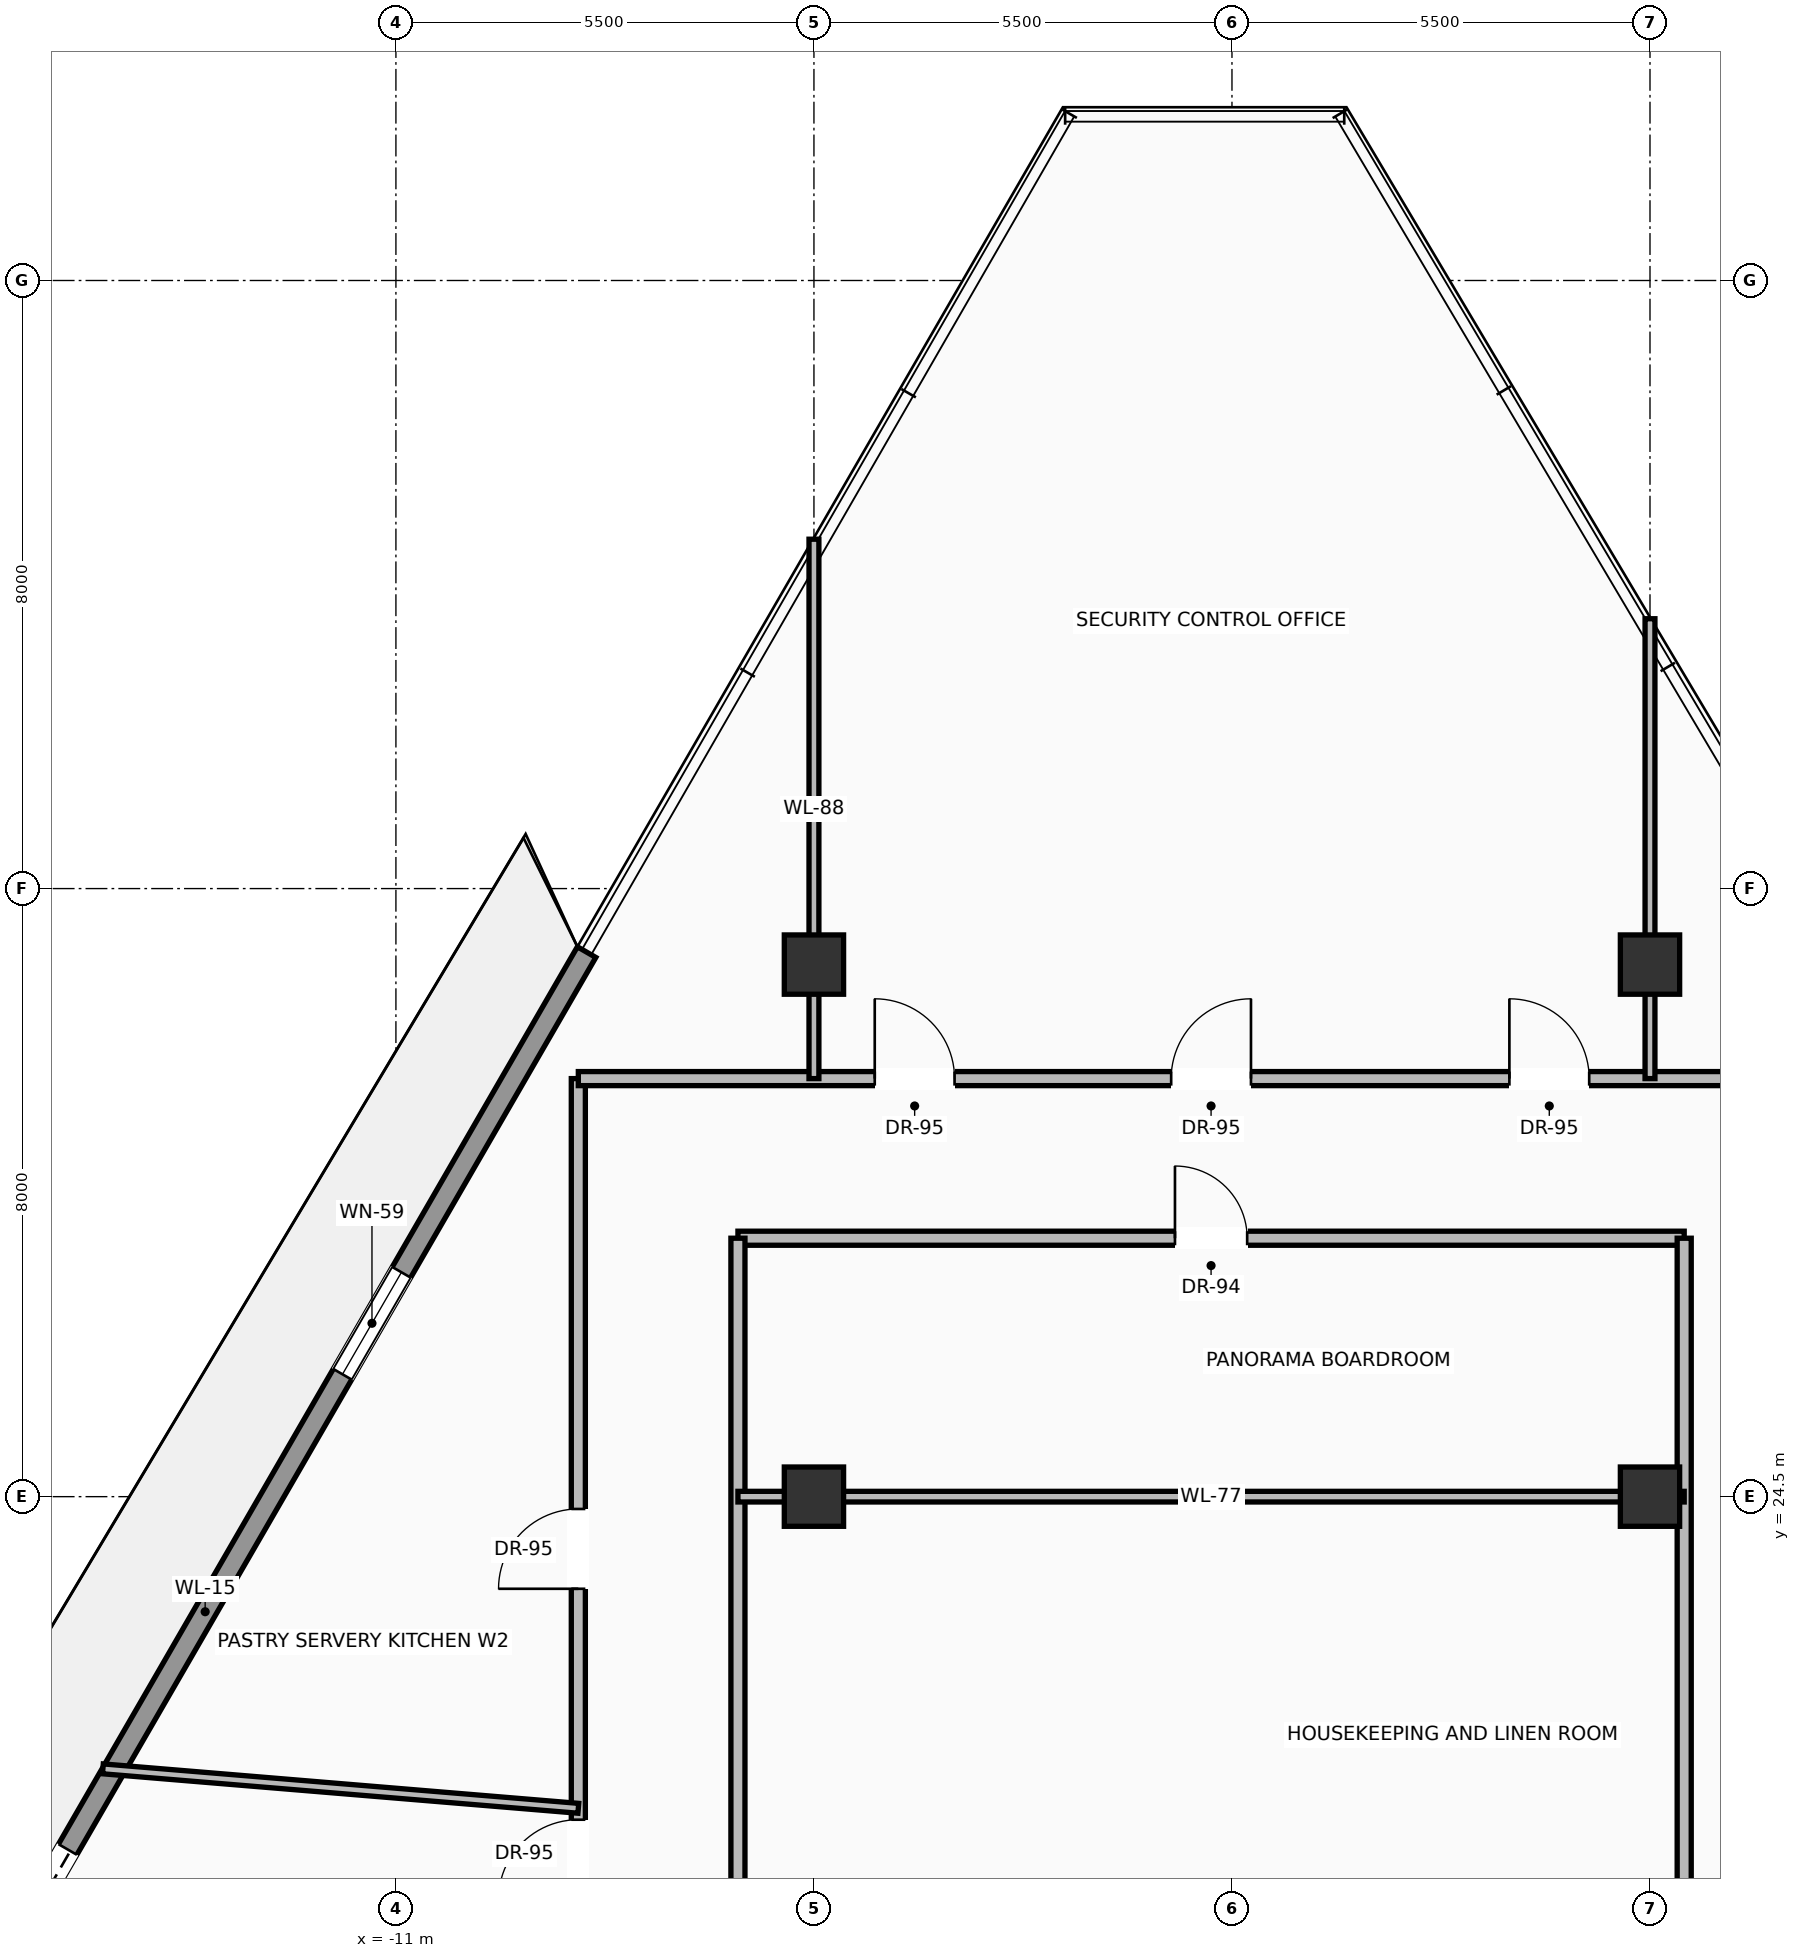
"""IFC4 building model, lengths in metres.
Left out: names, types, materials, properties, quantities, classifications, styles, units other than length and angle.
Written with IfcOpenShell. Run it as: python <this file> out.ifc"""

import sys

from ifc_helpers import new_model, si_unit, direction, frame, frame_2d, origin, origin_2d, place, context, subcontext, project, spatial, rectangle, extrude, source, transform, mapped, element, fill, save


model = new_model("IFC4")
c1 = context("Model", 3, precision=1e-05, world=origin(), true_north=direction((0.0, 1.0)))
c2 = subcontext(c1, "Body", "Model", "MODEL_VIEW")
j1 = project(units=[si_unit("LENGTHUNIT", "METRE"), si_unit("PLANEANGLEUNIT", "RADIAN")], contexts=[c1])
p1 = place(None, origin())
s1 = spatial("IfcSite", under=j1, at=p1, CompositionType="ELEMENT")
p2 = place(p1, origin())
s2 = spatial("IfcBuilding", under=s1, at=p2, CompositionType="ELEMENT")
p3 = place(p2, frame((0.0, 0.0, 273.0)))
s3 = spatial("IfcBuildingStorey", under=s2, at=p3, CompositionType="ELEMENT", Elevation=273.0)
m1 = source(origin(), c2, "Body", "SweptSolid", [
    extrude(rectangle(XDim=0.78, YDim=0.78, at=origin_2d()), origin(), (0.0, 0.0, 1.0), 3.45),
])
for number, where, z_axis, x_axis in (
    (1, (-5.5, 24.5, 0.0), (0.0, 0.0, 1.0), (1.0, 0.0, 0.0)),
    (2, (5.5, 24.5, 0.0), (0.0, 0.0, 1.0), (1.0, 0.0, 0.0)),
    (3, (-5.5, 31.5, 0.0), (0.0, 0.0, 1.0), (1.0, 0.0, 0.0)),
    (4, (5.5, 31.5, 0.0), (0.0, 0.0, 1.0), (1.0, 0.0, 0.0)),
):
    element("IfcColumn", number, at=place(p3, frame(where, z_axis=z_axis, x_axis=x_axis)), inside=s3, PredefinedType="COLUMN", context=c2, shape_type="MappedRepresentation", body=[
        mapped(m1, transform((0.0, 0.0, 0.0), scale=1.0)),
    ])
p4 = place(p3, frame((-18.529, 14.308, 0.0), z_axis=(0.0, 0.0, 1.0), x_axis=(0.500615740451, 0.86566961389, 0.0)))
e5 = element("IfcWall", 5, at=p4, inside=s3, PredefinedType="SOLIDWALL", context=c2, shape_type="SweptSolid", body=[
    extrude(rectangle(XDim=20.05, YDim=0.28, at=frame_2d((10.025, 0.0))), origin(), (0.0, 0.0, 1.0), 2.82),
])
p5 = place(p4, frame((4.812, 0.0, 0.0)))
e6 = element("IfcOpeningElement", 6, at=p5, cuts=e5, PredefinedType="OPENING", context=c2, shape_type="SweptSolid", body=[
    extrude(rectangle(XDim=1.6, YDim=2.35, at=frame_2d((0.8, 1.175))), frame((0.0, 0.15, 0.0), z_axis=(0.0, -1.0, 0.0), x_axis=(1.0, 0.0, 0.0)), (0.0, 0.0, 1.0), 0.3),
])
p6 = place(p4, frame((13.634, 0.0, 0.9)))
e7 = element("IfcOpeningElement", 7, at=p6, cuts=e5, PredefinedType="OPENING", context=c2, shape_type="SweptSolid", body=[
    extrude(rectangle(XDim=1.55, YDim=1.75, at=frame_2d((0.775, 0.875))), frame((0.0, 0.15, 0.0), z_axis=(0.0, -1.0, 0.0), x_axis=(1.0, 0.0, 0.0)), (0.0, 0.0, 1.0), 0.3),
])
p7 = place(p3, frame((-6.5, 27.9, 0.0), z_axis=(0.0, 0.0, 1.0), x_axis=(1.0, 0.0, 0.0)))
e8 = element("IfcWall", 8, at=p7, inside=s3, PredefinedType="PARTITIONING", context=c2, shape_type="SweptSolid", body=[
    extrude(rectangle(XDim=12.45, YDim=0.185, at=frame_2d((6.225, 0.0))), origin(), (0.0, 0.0, 1.0), 2.885),
])
p8 = place(p7, frame((5.75, 0.0, 0.0)))
e9 = element("IfcOpeningElement", 9, at=p8, cuts=e8, PredefinedType="OPENING", context=c2, shape_type="SweptSolid", body=[
    extrude(rectangle(XDim=0.95, YDim=2.2, at=frame_2d((0.475, 1.1))), frame((0.0, 0.103, 0.0), z_axis=(0.0, -1.0, 0.0), x_axis=(1.0, 0.0, 0.0)), (0.0, 0.0, 1.0), 0.205),
])
for number, where, z_axis, x_axis in (
    (10, (-6.5, 18.4, 0.0), (0.0, 0.0, 1.0), (0.0, 1.0, 0.0)),
    (11, (5.95, 18.4, 0.0), (0.0, 0.0, 1.0), (0.0, 1.0, 0.0)),
):
    element("IfcWall", number, at=place(p3, frame(where, z_axis=z_axis, x_axis=x_axis)), inside=s3, PredefinedType="PARTITIONING", context=c2, shape_type="SweptSolid", body=[
        extrude(rectangle(XDim=9.5, YDim=0.185, at=frame_2d((4.75, 0.0))), origin(), (0.0, 0.0, 1.0), 3.232),
    ])
p9 = place(p3, frame((-8.6, 16.2, 0.0), z_axis=(0.0, 0.0, 1.0), x_axis=(0.0, 1.0, 0.0)))
e12 = element("IfcWall", 12, at=p9, inside=s3, PredefinedType="PARTITIONING", context=c2, shape_type="SweptSolid", body=[
    extrude(rectangle(XDim=13.8, YDim=0.185, at=frame_2d((6.9, 0.0))), origin(), (0.0, 0.0, 1.0), 3.232),
])
p10 = place(p9, frame((3.0, 0.0, 0.0)))
e13 = element("IfcOpeningElement", 13, at=p10, cuts=e12, PredefinedType="OPENING", context=c2, shape_type="SweptSolid", body=[
    extrude(rectangle(XDim=1.05, YDim=2.25, at=frame_2d((0.525, 1.125))), frame((0.0, 0.103, 0.0), z_axis=(0.0, -1.0, 0.0), x_axis=(1.0, 0.0, 0.0)), (0.0, 0.0, 1.0), 0.205),
])
p11 = place(p9, frame((7.088, 0.0, 0.0)))
e14 = element("IfcOpeningElement", 14, at=p11, cuts=e12, PredefinedType="OPENING", context=c2, shape_type="SweptSolid", body=[
    extrude(rectangle(XDim=1.05, YDim=2.25, at=frame_2d((0.525, 1.125))), frame((0.0, 0.103, 0.0), z_axis=(0.0, -1.0, 0.0), x_axis=(1.0, 0.0, 0.0)), (0.0, 0.0, 1.0), 0.205),
])
p12 = place(p3, frame((-8.6, 30.0, 0.0), z_axis=(0.0, 0.0, 1.0), x_axis=(1.0, 0.0, 0.0)))
e15 = element("IfcWall", 15, at=p12, inside=s3, PredefinedType="PARTITIONING", context=c2, shape_type="SweptSolid", body=[
    extrude(rectangle(XDim=16.65, YDim=0.185, at=frame_2d((8.325, 0.0))), origin(), (0.0, 0.0, 1.0), 3.232),
])
p13 = place(p12, frame((3.9, 0.0, 0.0)))
e16 = element("IfcOpeningElement", 16, at=p13, cuts=e15, PredefinedType="OPENING", context=c2, shape_type="SweptSolid", body=[
    extrude(rectangle(XDim=1.05, YDim=2.25, at=frame_2d((0.525, 1.125))), frame((0.0, 0.103, 0.0), z_axis=(0.0, -1.0, 0.0), x_axis=(1.0, 0.0, 0.0)), (0.0, 0.0, 1.0), 0.205),
])
p14 = place(p12, frame((7.8, 0.0, 0.0)))
e17 = element("IfcOpeningElement", 17, at=p14, cuts=e15, PredefinedType="OPENING", context=c2, shape_type="SweptSolid", body=[
    extrude(rectangle(XDim=1.05, YDim=2.25, at=frame_2d((0.525, 1.125))), frame((0.0, 0.103, 0.0), z_axis=(0.0, -1.0, 0.0), x_axis=(1.0, 0.0, 0.0)), (0.0, 0.0, 1.0), 0.205),
])
p15 = place(p12, frame((12.25, 0.0, 0.0)))
e18 = element("IfcOpeningElement", 18, at=p15, cuts=e15, PredefinedType="OPENING", context=c2, shape_type="SweptSolid", body=[
    extrude(rectangle(XDim=1.05, YDim=2.25, at=frame_2d((0.525, 1.125))), frame((0.0, 0.103, 0.0), z_axis=(0.0, -1.0, 0.0), x_axis=(1.0, 0.0, 0.0)), (0.0, 0.0, 1.0), 0.205),
])
p16 = place(p3, frame((-6.5, 24.5, 0.0), z_axis=(0.0, 0.0, 1.0), x_axis=(1.0, 0.0, 0.0)))
e19 = element("IfcWall", 19, at=p16, inside=s3, PredefinedType="PARTITIONING", context=c2, shape_type="SweptSolid", body=[
    extrude(rectangle(XDim=12.45, YDim=0.14, at=frame_2d((6.225, 0.0))), origin(), (0.0, 0.0, 1.0), 2.683),
])
p17 = place(p3, frame((-5.5, 30.0, 0.0), z_axis=(0.0, 0.0, 1.0), x_axis=(0.0, 1.0, 0.0)))
e20 = element("IfcWall", 20, at=p17, inside=s3, PredefinedType="PARTITIONING", context=c2, shape_type="SweptSolid", body=[
    extrude(rectangle(XDim=7.096, YDim=0.13, at=frame_2d((3.548, 0.0))), origin(), (0.0, 0.0, 1.0), 2.683),
])
p18 = place(p3, frame((5.5, 30.0, 0.0), z_axis=(0.0, 0.0, 1.0), x_axis=(0.0, 1.0, 0.0)))
e21 = element("IfcWall", 21, at=p18, inside=s3, PredefinedType="PARTITIONING", context=c2, shape_type="SweptSolid", body=[
    extrude(rectangle(XDim=6.05, YDim=0.13, at=frame_2d((3.025, 0.0))), origin(), (0.0, 0.0, 1.0), 2.683),
])
p19 = place(p3, frame((-14.855, 20.919, 0.0), z_axis=(0.0, 0.0, 1.0), x_axis=(0.996575202115, -0.082691393322, 0.0)))
e22 = element("IfcWall", 22, at=p19, inside=s3, PredefinedType="PARTITIONING", context=c2, shape_type="SweptSolid", body=[
    extrude(rectangle(XDim=6.277, YDim=0.13, at=frame_2d((3.138, 0.0))), origin(), (0.0, 0.0, 1.0), 3.232),
])
m2 = source(origin(), c2, "Body", "SweptSolid", [
    extrude(rectangle(XDim=1.6, YDim=2.35, at=frame_2d((0.8, 1.175))), frame((0.0, 0.025, 0.0), z_axis=(0.0, -1.0, 0.0), x_axis=(1.0, 0.0, 0.0)), (0.0, 0.0, 1.0), 0.05),
])
p20 = place(p5, origin())
e23 = element("IfcDoor", 23, at=p20, inside=s3, OperationType="SLIDING_TO_LEFT", PredefinedType="DOOR", context=c2, shape_type="MappedRepresentation", body=[
    mapped(m2, transform((0.0, 0.0, 0.0), scale=1.0)),
])
fill(e6, e23)
m3 = source(origin(), c2, "Body", "SweptSolid", [
    extrude(rectangle(XDim=1.55, YDim=1.75, at=frame_2d((0.775, 0.875))), frame((0.0, 0.03, 0.0), z_axis=(0.0, -1.0, 0.0), x_axis=(1.0, 0.0, 0.0)), (0.0, 0.0, 1.0), 0.06),
])
p21 = place(p6, origin())
e24 = element("IfcWindow", 24, at=p21, inside=s3, PartitioningType="SINGLE_PANEL", PredefinedType="WINDOW", context=c2, shape_type="MappedRepresentation", body=[
    mapped(m3, transform((0.0, 0.0, 0.0), scale=1.0)),
])
fill(e7, e24)
m4 = source(origin(), c2, "Body", "SweptSolid", [
    extrude(rectangle(XDim=0.95, YDim=2.2, at=frame_2d((0.475, 1.1))), frame((0.0, 0.025, 0.0), z_axis=(0.0, -1.0, 0.0), x_axis=(1.0, 0.0, 0.0)), (0.0, 0.0, 1.0), 0.05),
])
p22 = place(p8, origin())
e25 = element("IfcDoor", 25, at=p22, inside=s3, OperationType="SINGLE_SWING_LEFT", PredefinedType="DOOR", context=c2, shape_type="MappedRepresentation", body=[
    mapped(m4, transform((0.0, 0.0, 0.0), scale=1.0)),
])
fill(e9, e25)
m5 = source(origin(), c2, "Body", "SweptSolid", [
    extrude(rectangle(XDim=1.05, YDim=2.25, at=frame_2d((0.525, 1.125))), frame((0.0, 0.025, 0.0), z_axis=(0.0, -1.0, 0.0), x_axis=(1.0, 0.0, 0.0)), (0.0, 0.0, 1.0), 0.05),
])
p23 = place(p10, origin())
e26 = element("IfcDoor", 26, at=p23, inside=s3, OperationType="SINGLE_SWING_LEFT", PredefinedType="DOOR", context=c2, shape_type="MappedRepresentation", body=[
    mapped(m5, transform((0.0, 0.0, 0.0), scale=1.0)),
])
fill(e13, e26)
p24 = place(p11, origin())
e27 = element("IfcDoor", 27, at=p24, inside=s3, OperationType="SINGLE_SWING_LEFT", PredefinedType="DOOR", context=c2, shape_type="MappedRepresentation", body=[
    mapped(m5, transform((0.0, 0.0, 0.0), scale=1.0)),
])
fill(e14, e27)
p25 = place(p13, origin())
e28 = element("IfcDoor", 28, at=p25, inside=s3, OperationType="SINGLE_SWING_LEFT", PredefinedType="DOOR", context=c2, shape_type="MappedRepresentation", body=[
    mapped(m5, transform((0.0, 0.0, 0.0), scale=1.0)),
])
fill(e16, e28)
p26 = place(p14, origin())
e29 = element("IfcDoor", 29, at=p26, inside=s3, OperationType="SINGLE_SWING_RIGHT", PredefinedType="DOOR", context=c2, shape_type="MappedRepresentation", body=[
    mapped(m5, transform((0.0, 0.0, 0.0), scale=1.0)),
])
fill(e17, e29)
p27 = place(p15, origin())
e30 = element("IfcDoor", 30, at=p27, inside=s3, OperationType="SINGLE_SWING_LEFT", PredefinedType="DOOR", context=c2, shape_type="MappedRepresentation", body=[
    mapped(m5, transform((0.0, 0.0, 0.0), scale=1.0)),
])
fill(e18, e30)
save(model, sys.argv[1])
